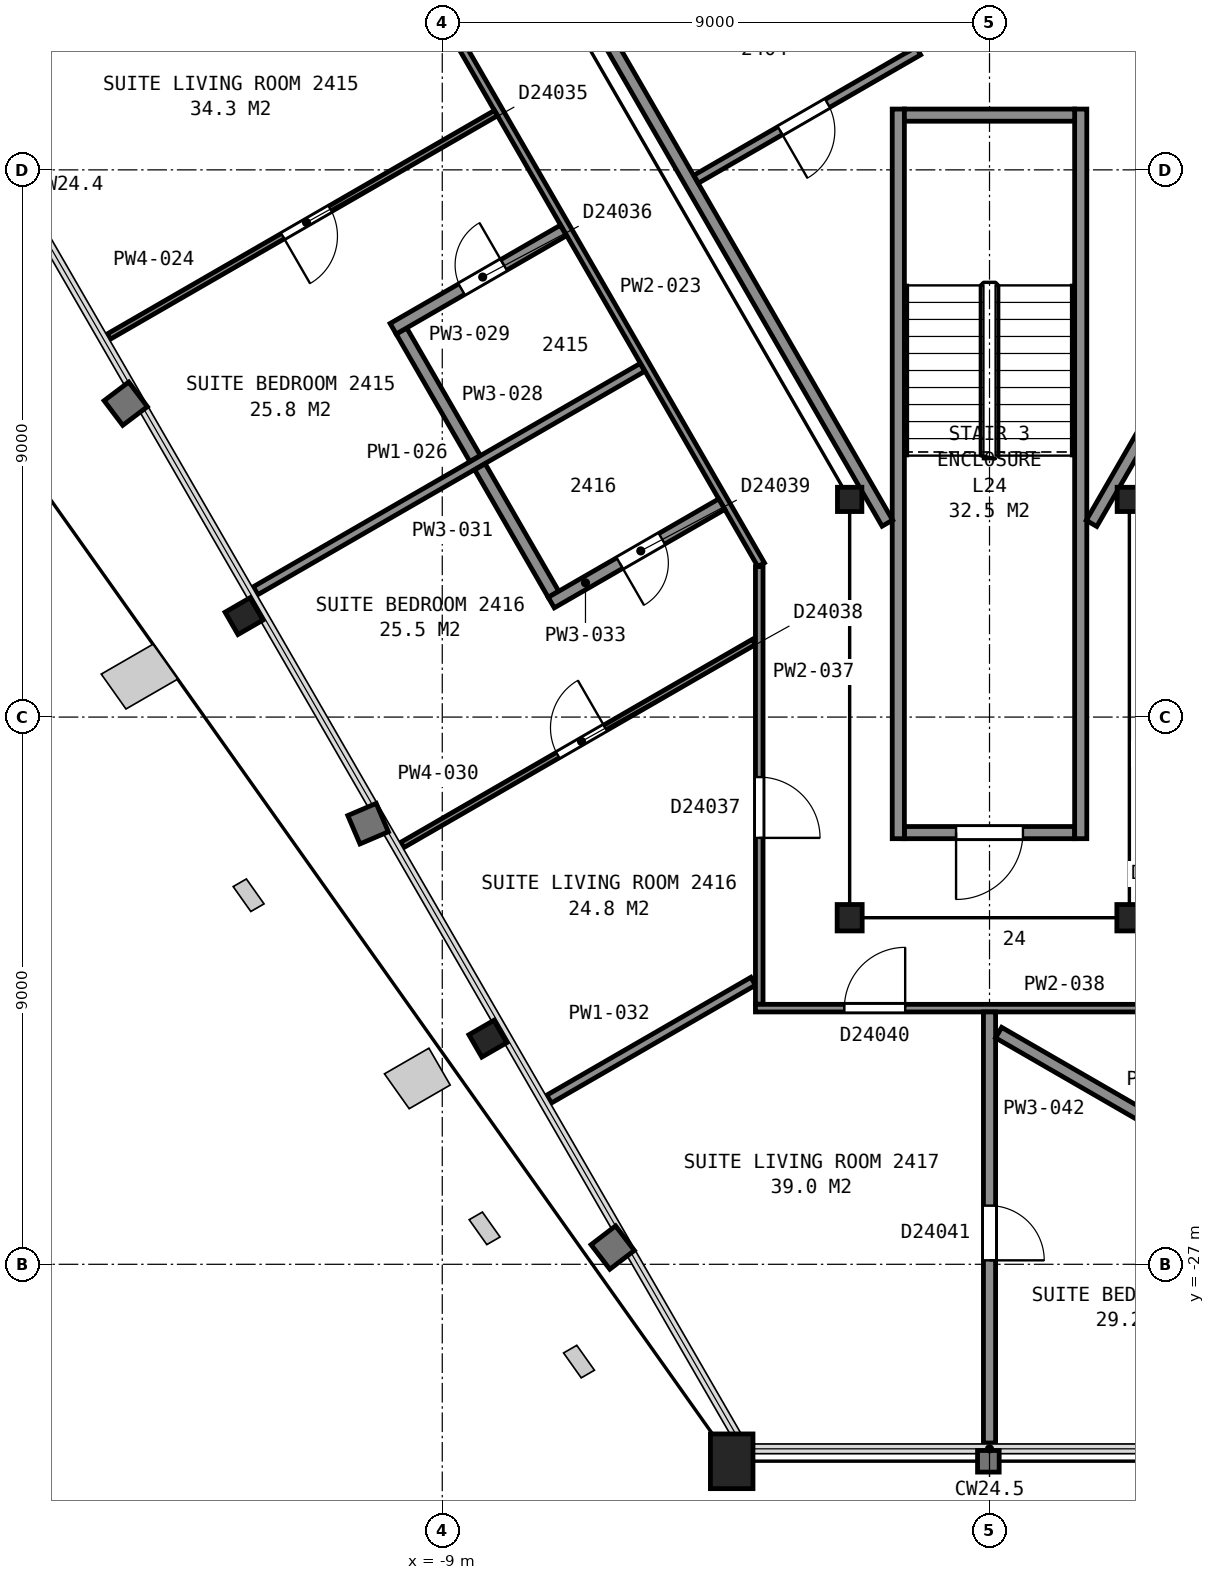
"""IFC4 building model, lengths in metres.
Left out: names, types, materials, properties, quantities, classifications, styles, units other than length and angle.
Written with IfcOpenShell. Run it as: python <this file> out.ifc"""

import sys

from ifc_helpers import new_model, si_unit, direction, frame, frame_2d, origin, origin_2d, place, context, subcontext, project, spatial, rectangle, hollow_rectangle, i_section, extrude, element, fill, save


model = new_model("IFC4")
c1 = context("Model", 3, precision=1e-05, world=origin(), true_north=direction((0.0, 1.0)))
c2 = subcontext(c1, "Body", "Model", "MODEL_VIEW")
j1 = project(units=[si_unit("LENGTHUNIT", "METRE"), si_unit("PLANEANGLEUNIT", "RADIAN")], contexts=[c1])
p1 = place(None, origin())
s1 = spatial("IfcSite", under=j1, at=p1, CompositionType="ELEMENT")
p2 = place(p1, origin())
s2 = spatial("IfcBuilding", under=s1, at=p2, CompositionType="ELEMENT")
p3 = place(p2, frame((0.0, 0.0, 103.6)))
s3 = spatial("IfcBuildingStorey", under=s2, at=p3, CompositionType="ELEMENT", Elevation=103.6)
p4 = place(p3, frame((-12.26, -16.34, 0.04), z_axis=(0.0, 0.0, 1.0), x_axis=(-0.5, 0.866025403784, 0.0)))
e1 = element("IfcColumn", 1, at=p4, inside=s3, PredefinedType="COLUMN", context=c2, shape_type="SweptSolid", body=[
    extrude(i_section(OverallWidth=0.424, OverallDepth=0.475, WebThickness=0.048, FlangeThickness=0.077, FilletRadius=0.015, at=origin_2d()), origin(), (0.0, 0.0, 1.0), 3.56),
])
p5 = place(p3, frame((-8.25, -23.29, 0.045), z_axis=(0.0, 0.0, 1.0), x_axis=(-0.5, 0.866025403784, 0.0)))
e2 = element("IfcColumn", 2, at=p5, inside=s3, PredefinedType="COLUMN", context=c2, shape_type="SweptSolid", body=[
    extrude(i_section(OverallWidth=0.424, OverallDepth=0.475, WebThickness=0.048, FlangeThickness=0.077, FilletRadius=0.015, at=origin_2d()), origin(), (0.0, 0.0, 1.0), 3.555),
])
p6 = place(p3, frame((-4.24, -30.24, 0.075), z_axis=(0.0, 0.0, 1.0), x_axis=(-1.0, 0.0, 0.0)))
e3 = element("IfcColumn", 3, at=p6, inside=s3, PredefinedType="COLUMN", context=c2, shape_type="SweptSolid", body=[
    extrude(hollow_rectangle(XDim=0.7, YDim=0.9, WallThickness=0.065, at=origin_2d()), origin(), (0.0, 0.0, 1.0), 3.525),
])
p7 = place(p3, frame((-2.3, -14.42, 0.0), z_axis=(0.0, 0.0, 1.0), x_axis=(1.0, 0.0, 0.0)))
e4 = element("IfcColumn", 4, at=p7, inside=s3, PredefinedType="COLUMN", context=c2, shape_type="SweptSolid", body=[
    extrude(i_section(OverallWidth=0.401, OverallDepth=0.399, WebThickness=0.025, FlangeThickness=0.04, FilletRadius=0.015, at=origin_2d()), origin(), (0.0, 0.0, 1.0), 3.6),
])
for number, where, z_axis, x_axis in (
    (5, (-2.3, -21.3, 0.0), (0.0, 0.0, 1.0), (-1.0, 0.0, 0.0)),
    (6, (2.3, -21.3, 0.0), (0.0, 0.0, 1.0), (-1.0, 0.0, 0.0)),
):
    element("IfcColumn", number, at=place(p3, frame(where, z_axis=z_axis, x_axis=x_axis)), inside=s3, PredefinedType="COLUMN", context=c2, shape_type="SweptSolid", body=[
        extrude(i_section(OverallWidth=0.411, OverallDepth=0.434, WebThickness=0.036, FlangeThickness=0.057, FilletRadius=0.015, at=origin_2d()), origin(), (0.0, 0.0, 1.0), 3.6),
    ])
p8 = place(p3, frame((2.3, -14.42, 0.0), z_axis=(0.0, 0.0, 1.0), x_axis=(1.0, 0.0, 0.0)))
e7 = element("IfcColumn", 7, at=p8, inside=s3, PredefinedType="COLUMN", context=c2, shape_type="SweptSolid", body=[
    extrude(i_section(OverallWidth=0.401, OverallDepth=0.399, WebThickness=0.025, FlangeThickness=0.04, FilletRadius=0.015, at=origin_2d()), origin(), (0.0, 0.0, 1.0), 3.6),
])
p9 = place(p3, frame((-1.4, -19.9, 0.0), z_axis=(0.0, 0.0, 1.0), x_axis=(1.0, 0.0, 0.0)))
e8 = element("IfcWall", 8, at=p9, inside=s3, PredefinedType="PARTITIONING", context=c2, shape_type="SweptSolid", body=[
    extrude(rectangle(XDim=2.8, YDim=0.2, at=frame_2d((1.4, 0.0))), origin(), (0.0, 0.0, 1.0), 3.35),
])
p10 = place(p9, frame((0.85, 0.0, 0.0)))
e9 = element("IfcOpeningElement", 9, at=p10, cuts=e8, PredefinedType="OPENING", context=c2, shape_type="SweptSolid", body=[
    extrude(rectangle(XDim=1.1, YDim=2.1, at=frame_2d((0.55, 1.05))), frame((0.0, 0.11, 0.0), z_axis=(0.0, -1.0, 0.0), x_axis=(1.0, 0.0, 0.0)), (0.0, 0.0, 1.0), 0.22),
])
for number, where, z_axis, x_axis in (
    (10, (1.5, -8.0, 0.0), (0.0, 0.0, 1.0), (0.0, -1.0, 0.0)),
    (11, (-1.5, -8.0, 0.0), (0.0, 0.0, 1.0), (0.0, -1.0, 0.0)),
):
    element("IfcWall", number, at=place(p3, frame(where, z_axis=z_axis, x_axis=x_axis)), inside=s3, PredefinedType="PARTITIONING", context=c2, shape_type="SweptSolid", body=[
        extrude(rectangle(XDim=12.0, YDim=0.2, at=frame_2d((6.0, 0.0))), origin(), (0.0, 0.0, 1.0), 3.35),
    ])
p11 = place(p3, frame((-1.4, -8.1, 0.0), z_axis=(0.0, 0.0, 1.0), x_axis=(1.0, 0.0, 0.0)))
e12 = element("IfcWall", 12, at=p11, inside=s3, PredefinedType="PARTITIONING", context=c2, shape_type="SweptSolid", body=[
    extrude(rectangle(XDim=2.8, YDim=0.2, at=frame_2d((1.4, 0.0))), origin(), (0.0, 0.0, 1.0), 3.35),
])
p12 = place(p3, frame((-13.664, 5.946, 0.0), z_axis=(0.0, 0.0, 1.0), x_axis=(0.499994327219, -0.866028678941, 0.0)))
e13 = element("IfcWall", 13, at=p12, inside=s3, PredefinedType="PARTITIONING", context=c2, shape_type="SweptSolid", body=[
    extrude(rectangle(XDim=23.968, YDim=0.2, at=frame_2d((11.984, 0.0))), origin(), (0.0, 0.0, 1.0), 3.35),
])
p13 = place(p3, frame((-4.825, -9.154, 0.0), z_axis=(0.0, 0.0, 1.0), x_axis=(0.866023738697, 0.500002884005, 0.0)))
e14 = element("IfcWall", 14, at=p13, inside=s3, PredefinedType="PARTITIONING", context=c2, shape_type="SweptSolid", body=[
    extrude(rectangle(XDim=4.22, YDim=0.15, at=frame_2d((2.11, 0.0))), origin(), (0.0, 0.0, 1.0), 3.35),
])
p14 = place(p13, frame((1.595, 0.0, 0.0)))
e15 = element("IfcOpeningElement", 15, at=p14, cuts=e14, PredefinedType="OPENING", context=c2, shape_type="SweptSolid", body=[
    extrude(rectangle(XDim=0.9, YDim=2.1, at=frame_2d((0.45, 1.05))), frame((0.0, 0.085, 0.0), z_axis=(0.0, -1.0, 0.0), x_axis=(1.0, 0.0, 0.0)), (0.0, 0.0, 1.0), 0.17),
])
p15 = place(p3, frame((1.677, -14.815, 0.0), z_axis=(0.0, 0.0, 1.0), x_axis=(0.49999445743, 0.866028603765, 0.0)))
e16 = element("IfcWall", 16, at=p15, inside=s3, PredefinedType="PARTITIONING", context=c2, shape_type="SweptSolid", body=[
    extrude(rectangle(XDim=5.905, YDim=0.2, at=frame_2d((2.952, 0.0))), origin(), (0.0, 0.0, 1.0), 3.35),
])
p16 = place(p15, frame((3.855, 0.0, 0.0)))
e17 = element("IfcOpeningElement", 17, at=p16, cuts=e16, PredefinedType="OPENING", context=c2, shape_type="SweptSolid", body=[
    extrude(rectangle(XDim=1.8, YDim=2.1, at=frame_2d((0.9, 1.05))), frame((0.0, 0.11, 0.0), z_axis=(0.0, -1.0, 0.0), x_axis=(1.0, 0.0, 0.0)), (0.0, 0.0, 1.0), 0.22),
])
p17 = place(p3, frame((-16.898, -7.562, 0.0), z_axis=(0.0, 0.0, 1.0), x_axis=(0.866055004685, 0.499948726231, 0.0)))
e18 = element("IfcWall", 18, at=p17, inside=s3, PredefinedType="PARTITIONING", context=c2, shape_type="SweptSolid", body=[
    extrude(rectangle(XDim=7.347, YDim=0.15, at=frame_2d((3.674, 0.0))), origin(), (0.0, 0.0, 1.0), 2.613),
])
p18 = place(p3, frame((-3.756, -15.494, 0.0), z_axis=(0.0, 0.0, 1.0), x_axis=(-0.500027787016, 0.866009360349, 0.0)))
e19 = element("IfcWall", 19, at=p18, inside=s3, PredefinedType="PARTITIONING", context=c2, shape_type="SweptSolid", body=[
    extrude(rectangle(XDim=23.856, YDim=0.125, at=frame_2d((11.928, 0.0))), origin(), (0.0, 0.0, 1.0), 2.613),
])
p19 = place(p18, frame((15.368, 0.0, 0.0)))
e20 = element("IfcOpeningElement", 20, at=p19, cuts=e19, PredefinedType="OPENING", context=c2, shape_type="SweptSolid", body=[
    extrude(rectangle(XDim=1.0, YDim=2.1, at=frame_2d((0.5, 1.05))), frame((0.0, 0.073, 0.0), z_axis=(0.0, -1.0, 0.0), x_axis=(1.0, 0.0, 0.0)), (0.0, 0.0, 1.0), 0.145),
])
p20 = place(p18, frame((10.54, 0.0, 0.0)))
e21 = element("IfcOpeningElement", 21, at=p20, cuts=e19, PredefinedType="OPENING", context=c2, shape_type="SweptSolid", body=[
    extrude(rectangle(XDim=1.0, YDim=2.1, at=frame_2d((0.5, 1.05))), frame((0.0, 0.073, 0.0), z_axis=(0.0, -1.0, 0.0), x_axis=(1.0, 0.0, 0.0)), (0.0, 0.0, 1.0), 0.145),
])
p21 = place(p3, frame((-8.117, -8.066, 0.0), z_axis=(0.0, 0.0, 1.0), x_axis=(-0.866052324842, -0.499953368461, 0.0)))
e22 = element("IfcWall", 22, at=p21, inside=s3, PredefinedType="PARTITIONING", context=c2, shape_type="SweptSolid", body=[
    extrude(rectangle(XDim=7.352, YDim=0.1, at=frame_2d((3.676, 0.0))), origin(), (0.0, 0.0, 1.0), 2.613),
])
p22 = place(p21, frame((3.148, 0.0, 0.0)))
e23 = element("IfcOpeningElement", 23, at=p22, cuts=e22, PredefinedType="OPENING", context=c2, shape_type="SweptSolid", body=[
    extrude(rectangle(XDim=0.9, YDim=2.1, at=frame_2d((0.45, 1.05))), frame((0.0, 0.06, 0.0), z_axis=(0.0, -1.0, 0.0), x_axis=(1.0, 0.0, 0.0)), (0.0, 0.0, 1.0), 0.12),
])
p23 = place(p3, frame((-12.071, -15.922, 0.0), z_axis=(0.0, 0.0, 1.0), x_axis=(0.866063309627, 0.499934339407, 0.0)))
e24 = element("IfcWall", 24, at=p23, inside=s3, PredefinedType="PARTITIONING", context=c2, shape_type="SweptSolid", body=[
    extrude(rectangle(XDim=7.348, YDim=0.15, at=frame_2d((3.674, 0.0))), origin(), (0.0, 0.0, 1.0), 2.613),
])
p24 = place(p3, frame((-9.671, -11.65, 0.0), z_axis=(0.0, 0.0, 1.0), x_axis=(0.50002218001, -0.866012597771, 0.0)))
e25 = element("IfcWall", 25, at=p24, inside=s3, PredefinedType="PARTITIONING", context=c2, shape_type="SweptSolid", body=[
    extrude(rectangle(XDim=2.421, YDim=0.2, at=frame_2d((1.21, 0.0))), origin(), (0.0, 0.0, 1.0), 2.613),
])
p25 = place(p3, frame((-7.008, -9.997, 0.0), z_axis=(0.0, 0.0, 1.0), x_axis=(-0.866078705744, -0.499907666931, 0.0)))
e26 = element("IfcWall", 26, at=p25, inside=s3, PredefinedType="PARTITIONING", context=c2, shape_type="SweptSolid", body=[
    extrude(rectangle(XDim=3.233, YDim=0.2, at=frame_2d((1.616, 0.0))), origin(), (0.0, 0.0, 1.0), 2.613),
])
p26 = place(p25, frame((1.133, 0.0, 0.0)))
e27 = element("IfcOpeningElement", 27, at=p26, cuts=e26, PredefinedType="OPENING", context=c2, shape_type="SweptSolid", body=[
    extrude(rectangle(XDim=0.8, YDim=2.1, at=frame_2d((0.4, 1.05))), frame((0.0, 0.11, 0.0), z_axis=(0.0, -1.0, 0.0), x_axis=(1.0, 0.0, 0.0)), (0.0, 0.0, 1.0), 0.22),
])
p27 = place(p3, frame((-9.657, -20.103, 0.0), z_axis=(0.0, 0.0, 1.0), x_axis=(0.865979781901, 0.500079011097, 0.0)))
e28 = element("IfcWall", 28, at=p27, inside=s3, PredefinedType="PARTITIONING", context=c2, shape_type="SweptSolid", body=[
    extrude(rectangle(XDim=6.678, YDim=0.1, at=frame_2d((3.339, 0.0))), origin(), (0.0, 0.0, 1.0), 2.613),
])
p28 = place(p27, frame((2.953, 0.0, 0.0)))
e29 = element("IfcOpeningElement", 29, at=p28, cuts=e28, PredefinedType="OPENING", context=c2, shape_type="SweptSolid", body=[
    extrude(rectangle(XDim=0.9, YDim=2.1, at=frame_2d((0.45, 1.05))), frame((0.0, 0.06, 0.0), z_axis=(0.0, -1.0, 0.0), x_axis=(1.0, 0.0, 0.0)), (0.0, 0.0, 1.0), 0.12),
])
p29 = place(p3, frame((-8.381, -13.884, 0.0), z_axis=(0.0, 0.0, 1.0), x_axis=(0.499795219151, -0.866143601786, 0.0)))
e30 = element("IfcWall", 30, at=p29, inside=s3, PredefinedType="PARTITIONING", context=c2, shape_type="SweptSolid", body=[
    extrude(rectangle(XDim=2.42, YDim=0.2, at=frame_2d((1.21, 0.0))), origin(), (0.0, 0.0, 1.0), 2.613),
])
p30 = place(p3, frame((-7.244, -24.283, 0.0), z_axis=(0.0, 0.0, 1.0), x_axis=(0.865997824551, 0.500047765591, 0.0)))
e31 = element("IfcWall", 31, at=p30, inside=s3, PredefinedType="PARTITIONING", context=c2, shape_type="SweptSolid", body=[
    extrude(rectangle(XDim=3.876, YDim=0.15, at=frame_2d((1.938, 0.0))), origin(), (0.0, 0.0, 1.0), 2.613),
])
p31 = place(p3, frame((-7.208, -16.117, 0.0), z_axis=(0.0, 0.0, 1.0), x_axis=(0.866091428368, 0.499885624626, 0.0)))
e32 = element("IfcWall", 32, at=p31, inside=s3, PredefinedType="PARTITIONING", context=c2, shape_type="SweptSolid", body=[
    extrude(rectangle(XDim=3.238, YDim=0.2, at=frame_2d((1.619, 0.0))), origin(), (0.0, 0.0, 1.0), 2.613),
])
p32 = place(p31, frame((1.3, 0.0, 0.0)))
e33 = element("IfcOpeningElement", 33, at=p32, cuts=e32, PredefinedType="OPENING", context=c2, shape_type="SweptSolid", body=[
    extrude(rectangle(XDim=0.8, YDim=2.1, at=frame_2d((0.4, 1.05))), frame((0.0, 0.11, 0.0), z_axis=(0.0, -1.0, 0.0), x_axis=(1.0, 0.0, 0.0)), (0.0, 0.0, 1.0), 0.22),
])
p33 = place(p3, frame((-3.787, -22.722, 0.0), z_axis=(0.0, 0.0, 1.0), x_axis=(0.0, 1.0, 0.0)))
e34 = element("IfcWall", 34, at=p33, inside=s3, PredefinedType="PARTITIONING", context=c2, shape_type="SweptSolid", body=[
    extrude(rectangle(XDim=7.197, YDim=0.125, at=frame_2d((3.599, 0.0))), origin(), (0.0, 0.0, 1.0), 2.613),
])
p34 = place(p33, frame((2.735, 0.0, 0.0)))
e35 = element("IfcOpeningElement", 35, at=p34, cuts=e34, PredefinedType="OPENING", context=c2, shape_type="SweptSolid", body=[
    extrude(rectangle(XDim=1.0, YDim=2.1, at=frame_2d((0.5, 1.05))), frame((0.0, 0.073, 0.0), z_axis=(0.0, -1.0, 0.0), x_axis=(1.0, 0.0, 0.0)), (0.0, 0.0, 1.0), 0.145),
])
p35 = place(p3, frame((3.85, -22.787, 0.0), z_axis=(0.0, 0.0, 1.0), x_axis=(-1.0, 0.0, 0.0)))
e36 = element("IfcWall", 36, at=p35, inside=s3, PredefinedType="PARTITIONING", context=c2, shape_type="SweptSolid", body=[
    extrude(rectangle(XDim=7.699, YDim=0.125, at=frame_2d((3.85, 0.0))), origin(), (0.0, 0.0, 1.0), 2.613),
])
p36 = place(p35, frame((5.237, 0.0, 0.0)))
e37 = element("IfcOpeningElement", 37, at=p36, cuts=e36, PredefinedType="OPENING", context=c2, shape_type="SweptSolid", body=[
    extrude(rectangle(XDim=1.0, YDim=2.1, at=frame_2d((0.5, 1.05))), frame((0.0, 0.073, 0.0), z_axis=(0.0, -1.0, 0.0), x_axis=(1.0, 0.0, 0.0)), (0.0, 0.0, 1.0), 0.145),
])
p37 = place(p3, frame((0.0, -22.85, 0.0), z_axis=(0.0, 0.0, 1.0), x_axis=(0.0, -1.0, 0.0)))
e38 = element("IfcWall", 38, at=p37, inside=s3, PredefinedType="PARTITIONING", context=c2, shape_type="SweptSolid", body=[
    extrude(rectangle(XDim=7.089, YDim=0.2, at=frame_2d((3.545, 0.0))), origin(), (0.0, 0.0, 1.0), 2.613),
])
p38 = place(p37, frame((3.186, 0.0, 0.0)))
e39 = element("IfcOpeningElement", 39, at=p38, cuts=e38, PredefinedType="OPENING", context=c2, shape_type="SweptSolid", body=[
    extrude(rectangle(XDim=0.9, YDim=2.1, at=frame_2d((0.45, 1.05))), frame((0.0, 0.11, 0.0), z_axis=(0.0, -1.0, 0.0), x_axis=(1.0, 0.0, 0.0)), (0.0, 0.0, 1.0), 0.22),
])
p39 = place(p3, frame((0.15, -23.19, 0.0), z_axis=(0.0, 0.0, 1.0), x_axis=(0.866061372545, -0.499937695103, 0.0)))
e40 = element("IfcWall", 40, at=p39, inside=s3, PredefinedType="PARTITIONING", context=c2, shape_type="SweptSolid", body=[
    extrude(rectangle(XDim=4.811, YDim=0.2, at=frame_2d((2.406, 0.0))), origin(), (0.0, 0.0, 1.0), 2.613),
])
p40 = place(p10, origin())
e41 = element("IfcDoor", 41, at=p40, inside=s3, OperationType="SINGLE_SWING_LEFT", PredefinedType="DOOR", context=c2, shape_type="SweptSolid", body=[
    extrude(rectangle(XDim=1.1, YDim=2.1, at=frame_2d((0.55, 1.05))), frame((0.0, 0.025, 0.0), z_axis=(0.0, -1.0, 0.0), x_axis=(1.0, 0.0, 0.0)), (0.0, 0.0, 1.0), 0.05),
])
fill(e9, e41)
p41 = place(p14, origin())
e42 = element("IfcDoor", 42, at=p41, inside=s3, OperationType="SINGLE_SWING_LEFT", PredefinedType="DOOR", context=c2, shape_type="SweptSolid", body=[
    extrude(rectangle(XDim=0.9, YDim=2.1, at=frame_2d((0.45, 1.05))), frame((0.0, 0.025, 0.0), z_axis=(0.0, -1.0, 0.0), x_axis=(1.0, 0.0, 0.0)), (0.0, 0.0, 1.0), 0.05),
])
fill(e15, e42)
p42 = place(p22, origin())
e43 = element("IfcDoor", 43, at=p42, inside=s3, OperationType="SINGLE_SWING_RIGHT", PredefinedType="DOOR", context=c2, shape_type="SweptSolid", body=[
    extrude(rectangle(XDim=0.9, YDim=2.1, at=frame_2d((0.45, 1.05))), frame((0.0, 0.025, 0.0), z_axis=(0.0, -1.0, 0.0), x_axis=(1.0, 0.0, 0.0)), (0.0, 0.0, 1.0), 0.05),
])
fill(e23, e43)
p43 = place(p26, origin())
e44 = element("IfcDoor", 44, at=p43, inside=s3, OperationType="SINGLE_SWING_LEFT", PredefinedType="DOOR", context=c2, shape_type="SweptSolid", body=[
    extrude(rectangle(XDim=0.8, YDim=2.1, at=frame_2d((0.4, 1.05))), frame((0.0, 0.025, 0.0), z_axis=(0.0, -1.0, 0.0), x_axis=(1.0, 0.0, 0.0)), (0.0, 0.0, 1.0), 0.05),
])
fill(e27, e44)
p44 = place(p28, origin())
e45 = element("IfcDoor", 45, at=p44, inside=s3, OperationType="SINGLE_SWING_RIGHT", PredefinedType="DOOR", context=c2, shape_type="SweptSolid", body=[
    extrude(rectangle(XDim=0.9, YDim=2.1, at=frame_2d((0.45, 1.05))), frame((0.0, 0.025, 0.0), z_axis=(0.0, -1.0, 0.0), x_axis=(1.0, 0.0, 0.0)), (0.0, 0.0, 1.0), 0.05),
])
fill(e29, e45)
p45 = place(p32, origin())
e46 = element("IfcDoor", 46, at=p45, inside=s3, OperationType="SINGLE_SWING_LEFT", PredefinedType="DOOR", context=c2, shape_type="SweptSolid", body=[
    extrude(rectangle(XDim=0.8, YDim=2.1, at=frame_2d((0.4, 1.05))), frame((0.0, 0.025, 0.0), z_axis=(0.0, -1.0, 0.0), x_axis=(1.0, 0.0, 0.0)), (0.0, 0.0, 1.0), 0.05),
])
fill(e33, e46)
p46 = place(p34, origin())
e47 = element("IfcDoor", 47, at=p46, inside=s3, OperationType="SINGLE_SWING_LEFT", PredefinedType="DOOR", context=c2, shape_type="SweptSolid", body=[
    extrude(rectangle(XDim=1.0, YDim=2.1, at=frame_2d((0.5, 1.05))), frame((0.0, 0.025, 0.0), z_axis=(0.0, -1.0, 0.0), x_axis=(1.0, 0.0, 0.0)), (0.0, 0.0, 1.0), 0.05),
])
fill(e35, e47)
p47 = place(p36, origin())
e48 = element("IfcDoor", 48, at=p47, inside=s3, OperationType="SINGLE_SWING_LEFT", PredefinedType="DOOR", context=c2, shape_type="SweptSolid", body=[
    extrude(rectangle(XDim=1.0, YDim=2.1, at=frame_2d((0.5, 1.05))), frame((0.0, 0.025, 0.0), z_axis=(0.0, -1.0, 0.0), x_axis=(1.0, 0.0, 0.0)), (0.0, 0.0, 1.0), 0.05),
])
fill(e37, e48)
p48 = place(p38, origin())
e49 = element("IfcDoor", 49, at=p48, inside=s3, OperationType="SINGLE_SWING_RIGHT", PredefinedType="DOOR", context=c2, shape_type="SweptSolid", body=[
    extrude(rectangle(XDim=0.9, YDim=2.1, at=frame_2d((0.45, 1.05))), frame((0.0, 0.025, 0.0), z_axis=(0.0, -1.0, 0.0), x_axis=(1.0, 0.0, 0.0)), (0.0, 0.0, 1.0), 0.05),
])
fill(e39, e49)
save(model, sys.argv[1])
